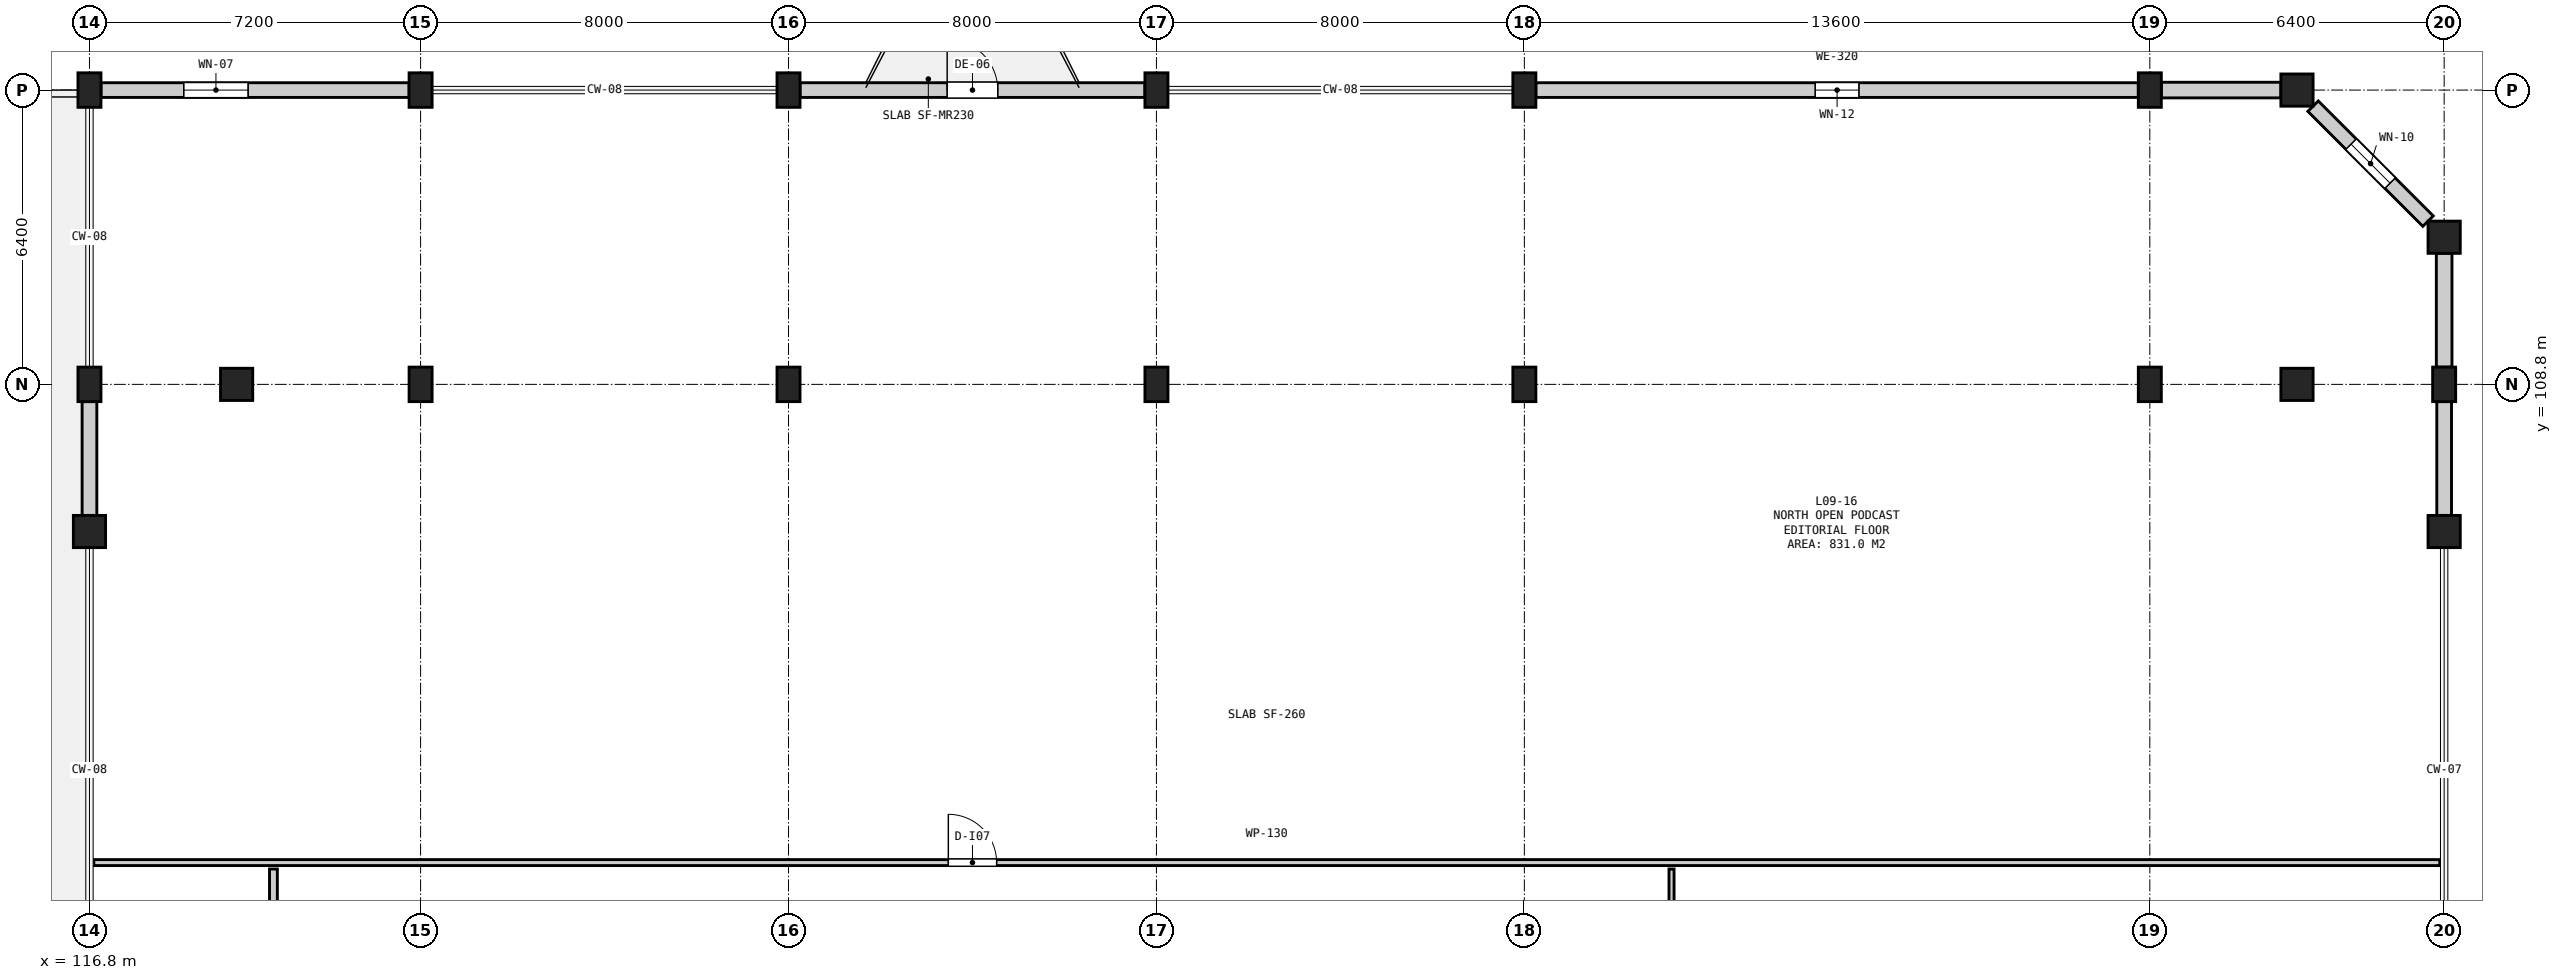
"""IFC4 building model, lengths in metres.
Left out: names, types, materials, properties, quantities, classifications, styles, units other than length and angle.
Written with IfcOpenShell. Run it as: python <this file> out.ifc"""

import sys

from ifc_helpers import new_model, si_unit, direction, frame, frame_2d, origin, origin_2d, place, context, subcontext, project, spatial, rectangle, circle, extrude, element, fill, save


model = new_model("IFC4")
c1 = context("Model", 3, precision=1e-05, world=origin(), true_north=direction((0.0, 1.0)))
c2 = subcontext(c1, "Body", "Model", "MODEL_VIEW")
j1 = project(units=[si_unit("LENGTHUNIT", "METRE"), si_unit("PLANEANGLEUNIT", "RADIAN")], contexts=[c1])
p1 = place(None, origin())
s1 = spatial("IfcSite", under=j1, at=p1, CompositionType="ELEMENT")
p2 = place(p1, origin())
s2 = spatial("IfcBuilding", under=s1, at=p2, CompositionType="ELEMENT")
p3 = place(p2, frame((0.0, 0.0, 39.5)))
s3 = spatial("IfcBuildingStorey", under=s2, at=p3, CompositionType="ELEMENT", Elevation=39.5)
p4 = place(p3, frame((116.8, 105.6, 0.0), z_axis=(0.0, 0.0, 1.0), x_axis=(1.0, 0.0, 0.0)))
e1 = element("IfcColumn", 1, at=p4, inside=s3, PredefinedType="COLUMN", context=c2, shape_type="SweptSolid", body=[
    extrude(circle(Radius=0.35, at=origin_2d()), origin(), (0.0, 0.0, 1.0), 3.8),
])
for number, where, z_axis, x_axis in (
    (2, (116.8, 108.8, 0.0), (0.0, 0.0, 1.0), (1.0, 0.0, 0.0)),
    (3, (116.8, 115.2, 0.0), (0.0, 0.0, 1.0), (1.0, 0.0, 0.0)),
):
    element("IfcColumn", number, at=place(p3, frame(where, z_axis=z_axis, x_axis=x_axis)), inside=s3, PredefinedType="COLUMN", context=c2, shape_type="SweptSolid", body=[
        extrude(rectangle(XDim=0.5, YDim=0.75, at=origin_2d()), origin(), (0.0, 0.0, 1.0), 3.8),
    ])
p5 = place(p3, frame((120.0, 108.8, 0.0), z_axis=(0.0, 0.0, 1.0), x_axis=(1.0, 0.0, 0.0)))
e4 = element("IfcColumn", 4, at=p5, inside=s3, PredefinedType="COLUMN", context=c2, shape_type="SweptSolid", body=[
    extrude(circle(Radius=0.35, at=origin_2d()), origin(), (0.0, 0.0, 1.0), 3.8),
])
for number, where, z_axis, x_axis in (
    (5, (124.0, 108.8, 0.0), (0.0, 0.0, 1.0), (1.0, 0.0, 0.0)),
    (6, (124.0, 115.2, 0.0), (0.0, 0.0, 1.0), (1.0, 0.0, 0.0)),
    (7, (132.0, 108.8, 0.0), (0.0, 0.0, 1.0), (1.0, 0.0, 0.0)),
    (8, (132.0, 115.2, 0.0), (0.0, 0.0, 1.0), (1.0, 0.0, 0.0)),
    (9, (140.0, 108.8, 0.0), (0.0, 0.0, 1.0), (1.0, 0.0, 0.0)),
    (10, (140.0, 115.2, 0.0), (0.0, 0.0, 1.0), (1.0, 0.0, 0.0)),
    (11, (148.0, 108.8, 0.0), (0.0, 0.0, 1.0), (1.0, 0.0, 0.0)),
    (12, (148.0, 115.2, 0.0), (0.0, 0.0, 1.0), (1.0, 0.0, 0.0)),
    (13, (161.6, 108.8, 0.0), (0.0, 0.0, 1.0), (1.0, 0.0, 0.0)),
    (14, (161.6, 115.2, 0.0), (0.0, 0.0, 1.0), (1.0, 0.0, 0.0)),
):
    element("IfcColumn", number, at=place(p3, frame(where, z_axis=z_axis, x_axis=x_axis)), inside=s3, PredefinedType="COLUMN", context=c2, shape_type="SweptSolid", body=[
        extrude(rectangle(XDim=0.5, YDim=0.75, at=origin_2d()), origin(), (0.0, 0.0, 1.0), 3.8),
    ])
for number, where, z_axis, x_axis in (
    (15, (164.8, 108.8, 0.0), (0.0, 0.0, 1.0), (1.0, 0.0, 0.0)),
    (16, (164.8, 115.2, 0.0), (0.0, 0.0, 1.0), (1.0, 0.0, 0.0)),
    (17, (168.0, 105.6, 0.0), (0.0, 0.0, 1.0), (1.0, 0.0, 0.0)),
):
    element("IfcColumn", number, at=place(p3, frame(where, z_axis=z_axis, x_axis=x_axis)), inside=s3, PredefinedType="COLUMN", context=c2, shape_type="SweptSolid", body=[
        extrude(circle(Radius=0.35, at=origin_2d()), origin(), (0.0, 0.0, 1.0), 3.8),
    ])
p6 = place(p3, frame((168.0, 108.8, 0.0), z_axis=(0.0, 0.0, 1.0), x_axis=(1.0, 0.0, 0.0)))
e18 = element("IfcColumn", 18, at=p6, inside=s3, PredefinedType="COLUMN", context=c2, shape_type="SweptSolid", body=[
    extrude(rectangle(XDim=0.5, YDim=0.75, at=origin_2d()), origin(), (0.0, 0.0, 1.0), 3.8),
])
p7 = place(p3, frame((168.0, 112.0, 0.0), z_axis=(0.0, 0.0, 1.0), x_axis=(1.0, 0.0, 0.0)))
e19 = element("IfcColumn", 19, at=p7, inside=s3, PredefinedType="COLUMN", context=c2, shape_type="SweptSolid", body=[
    extrude(circle(Radius=0.35, at=origin_2d()), origin(), (0.0, 0.0, 1.0), 3.8),
])
p8 = place(p3, frame((168.0, 105.95, 0.0), z_axis=(0.0, 0.0, 1.0), x_axis=(0.0, 1.0, 0.0)))
e20 = element("IfcWall", 20, at=p8, inside=s3, PredefinedType="SOLIDWALL", context=c2, shape_type="SweptSolid", body=[
    extrude(rectangle(XDim=2.475, YDim=0.32, at=frame_2d((1.238, 0.0))), origin(), (0.0, 0.0, 1.0), 2.475),
])
p9 = place(p3, frame((168.0, 109.175, 0.0), z_axis=(0.0, 0.0, 1.0), x_axis=(0.0, 1.0, 0.0)))
e21 = element("IfcWall", 21, at=p9, inside=s3, PredefinedType="SOLIDWALL", context=c2, shape_type="SweptSolid", body=[
    extrude(rectangle(XDim=2.475, YDim=0.34, at=frame_2d((1.237, 0.0))), origin(), (0.0, 0.0, 1.0), 2.94),
])
p10 = place(p3, frame((167.65, 112.35, 0.0), z_axis=(0.0, 0.0, 1.0), x_axis=(-0.707106781187, 0.707106781187, 0.0)))
e22 = element("IfcWall", 22, at=p10, inside=s3, PredefinedType="SOLIDWALL", context=c2, shape_type="SweptSolid", body=[
    extrude(rectangle(XDim=3.536, YDim=0.32, at=frame_2d((1.768, 0.0))), origin(), (0.0, 0.0, 1.0), 2.935),
])
p11 = place(p10, frame((1.168, 0.0, 0.9)))
e23 = element("IfcOpeningElement", 23, at=p11, cuts=e22, PredefinedType="OPENING", context=c2, shape_type="SweptSolid", body=[
    extrude(rectangle(XDim=1.2, YDim=1.7, at=frame_2d((0.6, 0.85))), frame((0.0, 0.172, 0.0), z_axis=(0.0, -1.0, 0.0), x_axis=(1.0, 0.0, 0.0)), (0.0, 0.0, 1.0), 0.344),
])
p12 = place(p3, frame((164.45, 115.2, 0.0), z_axis=(0.0, 0.0, 1.0), x_axis=(-1.0, 0.0, 0.0)))
e24 = element("IfcWall", 24, at=p12, inside=s3, PredefinedType="SOLIDWALL", context=c2, shape_type="SweptSolid", body=[
    extrude(rectangle(XDim=2.6, YDim=0.34, at=frame_2d((1.3, 0.0))), origin(), (0.0, 0.0, 1.0), 2.94),
])
p13 = place(p3, frame((161.35, 115.2, 0.0), z_axis=(0.0, 0.0, 1.0), x_axis=(-1.0, 0.0, 0.0)))
e25 = element("IfcWall", 25, at=p13, inside=s3, PredefinedType="SOLIDWALL", context=c2, shape_type="SweptSolid", body=[
    extrude(rectangle(XDim=13.1, YDim=0.32, at=frame_2d((6.55, 0.0))), origin(), (0.0, 0.0, 1.0), 2.475),
])
p14 = place(p13, frame((6.075, 0.0, 0.8)))
e26 = element("IfcOpeningElement", 26, at=p14, cuts=e25, PredefinedType="OPENING", context=c2, shape_type="SweptSolid", body=[
    extrude(rectangle(XDim=0.95, YDim=1.45, at=frame_2d((0.475, 0.725))), frame((0.0, 0.172, 0.0), z_axis=(0.0, -1.0, 0.0), x_axis=(1.0, 0.0, 0.0)), (0.0, 0.0, 1.0), 0.344),
])
p15 = place(p3, frame((139.75, 115.2, 0.0), z_axis=(0.0, 0.0, 1.0), x_axis=(-1.0, 0.0, 0.0)))
e27 = element("IfcWall", 27, at=p15, inside=s3, PredefinedType="SOLIDWALL", context=c2, shape_type="SweptSolid", body=[
    extrude(rectangle(XDim=7.5, YDim=0.32, at=frame_2d((3.75, 0.0))), origin(), (0.0, 0.0, 1.0), 2.94),
])
p16 = place(p15, frame((3.2, 0.0, 0.0)))
e28 = element("IfcOpeningElement", 28, at=p16, cuts=e27, PredefinedType="OPENING", context=c2, shape_type="SweptSolid", body=[
    extrude(rectangle(XDim=1.1, YDim=2.2, at=frame_2d((0.55, 1.1))), frame((0.0, 0.172, 0.0), z_axis=(0.0, -1.0, 0.0), x_axis=(1.0, 0.0, 0.0)), (0.0, 0.0, 1.0), 0.344),
])
p17 = place(p3, frame((123.75, 115.2, 0.0), z_axis=(0.0, 0.0, 1.0), x_axis=(-1.0, 0.0, 0.0)))
e29 = element("IfcWall", 29, at=p17, inside=s3, PredefinedType="SOLIDWALL", context=c2, shape_type="SweptSolid", body=[
    extrude(rectangle(XDim=6.7, YDim=0.32, at=frame_2d((3.35, 0.0))), origin(), (0.0, 0.0, 1.0), 2.94),
])
p18 = place(p17, frame((3.5, 0.0, 0.9)))
e30 = element("IfcOpeningElement", 30, at=p18, cuts=e29, PredefinedType="OPENING", context=c2, shape_type="SweptSolid", body=[
    extrude(rectangle(XDim=1.4, YDim=1.8, at=frame_2d((0.7, 0.9))), frame((0.0, 0.172, 0.0), z_axis=(0.0, -1.0, 0.0), x_axis=(1.0, 0.0, 0.0)), (0.0, 0.0, 1.0), 0.344),
])
p19 = place(p3, frame((116.8, 108.425, 0.0), z_axis=(0.0, 0.0, 1.0), x_axis=(0.0, -1.0, 0.0)))
e31 = element("IfcWall", 31, at=p19, inside=s3, PredefinedType="SOLIDWALL", context=c2, shape_type="SweptSolid", body=[
    extrude(rectangle(XDim=2.475, YDim=0.32, at=frame_2d((1.238, 0.0))), origin(), (0.0, 0.0, 1.0), 2.475),
])
p20 = place(p3, frame((116.895, 98.4, 0.0), z_axis=(0.0, 0.0, 1.0), x_axis=(1.0, 0.0, 0.0)))
e32 = element("IfcWall", 32, at=p20, inside=s3, PredefinedType="PARTITIONING", context=c2, shape_type="SweptSolid", body=[
    extrude(rectangle(XDim=51.01, YDim=0.13, at=frame_2d((25.505, 0.0))), origin(), (0.0, 0.0, 1.0), 3.52),
])
p21 = place(p20, frame((18.58, 0.0, 0.0)))
e33 = element("IfcOpeningElement", 33, at=p21, cuts=e32, PredefinedType="OPENING", context=c2, shape_type="SweptSolid", body=[
    extrude(rectangle(XDim=1.05, YDim=2.15, at=frame_2d((0.525, 1.075))), frame((0.0, 0.077, 0.0), z_axis=(0.0, -1.0, 0.0), x_axis=(1.0, 0.0, 0.0)), (0.0, 0.0, 1.0), 0.154),
])
p22 = place(p3, frame((151.2, 87.34, 0.0), z_axis=(0.0, 0.0, 1.0), x_axis=(0.0, 1.0, 0.0)))
e34 = element("IfcWall", 34, at=p22, inside=s3, PredefinedType="PARTITIONING", context=c2, shape_type="SweptSolid", body=[
    extrude(rectangle(XDim=10.92, YDim=0.11, at=frame_2d((5.46, 0.0))), origin(), (0.0, 0.0, 1.0), 3.52),
])
p23 = place(p22, frame((4.935, 0.0, 0.0)))
e35 = element("IfcOpeningElement", 35, at=p23, cuts=e34, PredefinedType="OPENING", context=c2, shape_type="SweptSolid", body=[
    extrude(rectangle(XDim=1.05, YDim=2.15, at=frame_2d((0.525, 1.075))), frame((0.0, 0.067, 0.0), z_axis=(0.0, -1.0, 0.0), x_axis=(1.0, 0.0, 0.0)), (0.0, 0.0, 1.0), 0.134),
])
p24 = place(p3, frame((120.8, 76.14, 0.0), z_axis=(0.0, 0.0, 1.0), x_axis=(0.0, 1.0, 0.0)))
e36 = element("IfcWall", 36, at=p24, inside=s3, PredefinedType="PARTITIONING", context=c2, shape_type="SweptSolid", body=[
    extrude(rectangle(XDim=22.12, YDim=0.17, at=frame_2d((11.06, 0.0))), origin(), (0.0, 0.0, 1.0), 3.52),
])
p25 = place(p24, frame((6.535, 0.0, 0.0)))
e37 = element("IfcOpeningElement", 37, at=p25, cuts=e36, PredefinedType="OPENING", context=c2, shape_type="SweptSolid", body=[
    extrude(rectangle(XDim=1.05, YDim=2.15, at=frame_2d((0.525, 1.075))), frame((0.0, 0.097, 0.0), z_axis=(0.0, -1.0, 0.0), x_axis=(1.0, 0.0, 0.0)), (0.0, 0.0, 1.0), 0.194),
])
p26 = place(p11, origin())
e38 = element("IfcWindow", 38, at=p26, inside=s3, PartitioningType="SINGLE_PANEL", PredefinedType="WINDOW", context=c2, shape_type="SweptSolid", body=[
    extrude(rectangle(XDim=1.2, YDim=1.7, at=frame_2d((0.6, 0.85))), frame((0.0, 0.03, 0.0), z_axis=(0.0, -1.0, 0.0), x_axis=(1.0, 0.0, 0.0)), (0.0, 0.0, 1.0), 0.06),
])
fill(e23, e38)
p27 = place(p14, origin())
e39 = element("IfcWindow", 39, at=p27, inside=s3, PartitioningType="SINGLE_PANEL", PredefinedType="WINDOW", context=c2, shape_type="SweptSolid", body=[
    extrude(rectangle(XDim=0.95, YDim=1.45, at=frame_2d((0.475, 0.725))), frame((0.0, 0.03, 0.0), z_axis=(0.0, -1.0, 0.0), x_axis=(1.0, 0.0, 0.0)), (0.0, 0.0, 1.0), 0.06),
])
fill(e26, e39)
p28 = place(p16, frame((1.1, 0.0, 0.0), z_axis=(0.0, 0.0, 1.0), x_axis=(-1.0, 0.0, 0.0)))
e40 = element("IfcDoor", 40, at=p28, inside=s3, OperationType="SINGLE_SWING_LEFT", PredefinedType="DOOR", context=c2, shape_type="SweptSolid", body=[
    extrude(rectangle(XDim=1.1, YDim=2.2, at=frame_2d((0.55, 1.1))), frame((0.0, 0.025, 0.0), z_axis=(0.0, -1.0, 0.0), x_axis=(1.0, 0.0, 0.0)), (0.0, 0.0, 1.0), 0.05),
])
fill(e28, e40)
p29 = place(p18, origin())
e41 = element("IfcWindow", 41, at=p29, inside=s3, PartitioningType="SINGLE_PANEL", PredefinedType="WINDOW", context=c2, shape_type="SweptSolid", body=[
    extrude(rectangle(XDim=1.4, YDim=1.8, at=frame_2d((0.7, 0.9))), frame((0.0, 0.03, 0.0), z_axis=(0.0, -1.0, 0.0), x_axis=(1.0, 0.0, 0.0)), (0.0, 0.0, 1.0), 0.06),
])
fill(e30, e41)
p30 = place(p21, origin())
e42 = element("IfcDoor", 42, at=p30, inside=s3, OperationType="SINGLE_SWING_LEFT", PredefinedType="DOOR", context=c2, shape_type="SweptSolid", body=[
    extrude(rectangle(XDim=1.05, YDim=2.15, at=frame_2d((0.525, 1.075))), frame((0.0, 0.025, 0.0), z_axis=(0.0, -1.0, 0.0), x_axis=(1.0, 0.0, 0.0)), (0.0, 0.0, 1.0), 0.05),
])
fill(e33, e42)
save(model, sys.argv[1])
